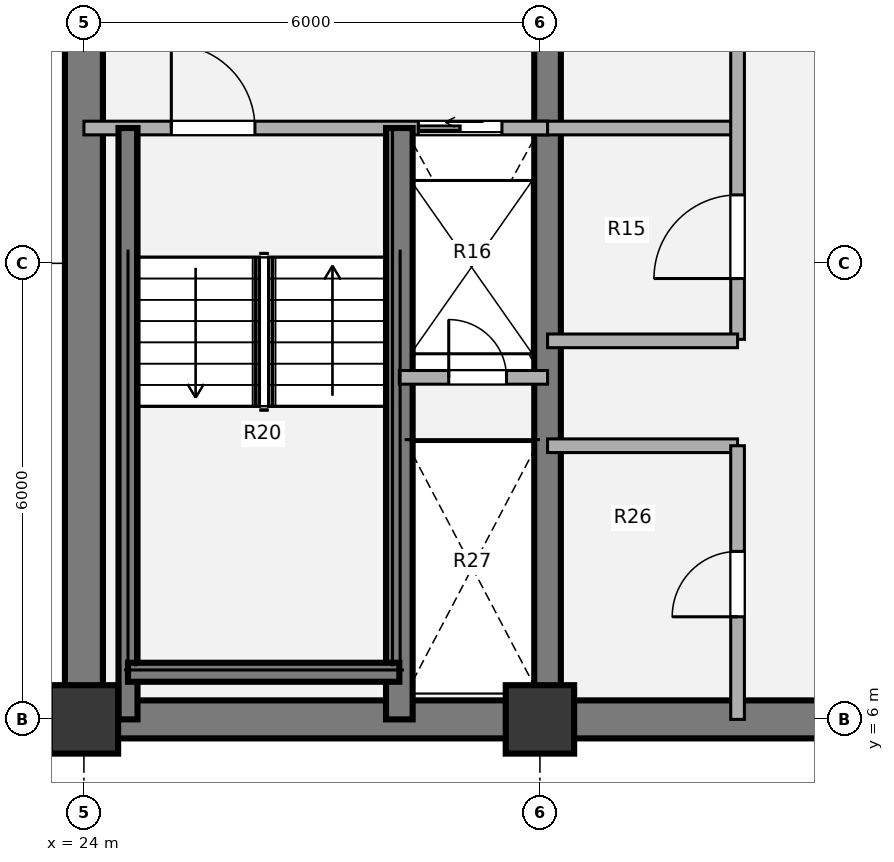
"""IFC4 building model, lengths in metres.
Left out: names, types, materials, properties, quantities, classifications, styles, units other than length and angle.
Written with IfcOpenShell. Run it as: python <this file> out.ifc"""

import sys

from ifc_helpers import new_model, si_unit, direction, frame, frame_2d, origin, origin_2d, place, context, subcontext, project, spatial, rectangle, extrude, source, transform, mapped, element, fill, save


model = new_model("IFC4")
c1 = context("Model", 3, precision=1e-05, world=origin(), true_north=direction((0.0, 1.0)))
c2 = subcontext(c1, "Body", "Model", "MODEL_VIEW")
j1 = project(units=[si_unit("LENGTHUNIT", "METRE"), si_unit("PLANEANGLEUNIT", "RADIAN")], contexts=[c1])
p1 = place(None, origin())
s1 = spatial("IfcSite", under=j1, at=p1, CompositionType="ELEMENT")
p2 = place(p1, origin())
s2 = spatial("IfcBuilding", under=s1, at=p2, CompositionType="ELEMENT")
p3 = place(p2, frame((0.0, 0.0, 146.52)))
s3 = spatial("IfcBuildingStorey", under=s2, at=p3, CompositionType="ELEMENT", Elevation=146.52)
m1 = source(origin(), c2, "Body", "SweptSolid", [
    extrude(rectangle(XDim=0.9, YDim=0.9, at=origin_2d()), origin(), (0.0, 0.0, 1.0), 5.4),
])
for number, where, z_axis, x_axis in (
    (1, (24.0, 6.0, 0.0), (0.0, 0.0, 1.0), (1.0, 0.0, 0.0)),
    (2, (30.0, 6.0, 0.0), (0.0, 0.0, 1.0), (1.0, 0.0, 0.0)),
):
    element("IfcColumn", number, at=place(p3, frame(where, z_axis=z_axis, x_axis=x_axis)), inside=s3, PredefinedType="COLUMN", context=c2, shape_type="MappedRepresentation", body=[
        mapped(m1, transform((0.0, 0.0, 0.0), x_axis=(1.0, 0.0, 0.0), y_axis=(0.0, 1.0, 0.0), z_axis=(0.0, 0.0, 1.0), scale=1.0)),
    ])
p4 = place(p3, frame((48.25, 6.0, 0.0), z_axis=(0.0, 0.0, 1.0), x_axis=(-1.0, 0.0, 0.0)))
e3 = element("IfcWall", 3, at=p4, inside=s3, PredefinedType="SHEAR", context=c2, shape_type="SweptSolid", body=[
    extrude(rectangle(XDim=24.5, YDim=0.5, at=frame_2d((12.25, 0.0))), origin(), (0.0, 0.0, 1.0), 5.4),
])
p5 = place(p3, frame((24.0, 6.0, 0.0), z_axis=(0.0, 0.0, 1.0), x_axis=(0.0, 1.0, 0.0)))
e4 = element("IfcWall", 4, at=p5, inside=s3, PredefinedType="SHEAR", context=c2, shape_type="SweptSolid", body=[
    extrude(rectangle(XDim=12.0, YDim=0.5, at=frame_2d((6.0, 0.0))), origin(), (0.0, 0.0, 1.0), 5.4),
])
p6 = place(p3, frame((30.1, 6.0, 0.0), z_axis=(0.0, 0.0, 1.0), x_axis=(0.0, 1.0, 0.0)))
e5 = element("IfcWall", 5, at=p6, inside=s3, PredefinedType="SHEAR", context=c2, shape_type="SweptSolid", body=[
    extrude(rectangle(XDim=12.0, YDim=0.35, at=frame_2d((6.0, 0.0))), origin(), (0.0, 0.0, 1.0), 5.4),
])
p7 = place(p3, frame((30.0, 13.78, 0.0), z_axis=(0.0, 0.0, 1.0), x_axis=(1.0, 0.0, 0.0)))
e6 = element("IfcWall", 6, at=p7, inside=s3, PredefinedType="PARTITIONING", context=c2, shape_type="SweptSolid", body=[
    extrude(rectangle(XDim=2.6, YDim=0.18, at=frame_2d((1.3, 0.0))), origin(), (0.0, 0.0, 1.0), 5.05),
])
p8 = place(p3, frame((32.6, 11.0, 0.0), z_axis=(0.0, 0.0, 1.0), x_axis=(0.0, 1.0, 0.0)))
e7 = element("IfcWall", 7, at=p8, inside=s3, PredefinedType="PARTITIONING", context=c2, shape_type="SweptSolid", body=[
    extrude(rectangle(XDim=7.0, YDim=0.18, at=frame_2d((3.5, 0.0))), origin(), (0.0, 0.0, 1.0), 5.05),
])
p9 = place(p8, frame((0.8, 0.0, 0.0)))
e8 = element("IfcOpeningElement", 8, at=p9, cuts=e7, PredefinedType="OPENING", context=c2, shape_type="SweptSolid", body=[
    extrude(rectangle(XDim=1.1, YDim=2.1, at=origin_2d()), frame((0.55, 0.1, 1.05), z_axis=(0.0, -1.0, 0.0), x_axis=(1.0, 0.0, 0.0)), (0.0, 0.0, 1.0), 0.2),
])
for number, where, z_axis, x_axis in (
    (9, (30.1, 10.98, 0.0), (0.0, 0.0, 1.0), (1.0, 0.0, 0.0)),
    (10, (30.1, 9.6, 0.0), (0.0, 0.0, 1.0), (1.0, 0.0, 0.0)),
):
    element("IfcWall", number, at=place(p3, frame(where, z_axis=z_axis, x_axis=x_axis)), inside=s3, PredefinedType="PARTITIONING", context=c2, shape_type="SweptSolid", body=[
        extrude(rectangle(XDim=2.5, YDim=0.18, at=frame_2d((1.25, 0.0))), origin(), (0.0, 0.0, 1.0), 5.05),
    ])
p10 = place(p3, frame((32.6, 6.0, 0.0), z_axis=(0.0, 0.0, 1.0), x_axis=(0.0, 1.0, 0.0)))
e11 = element("IfcWall", 11, at=p10, inside=s3, PredefinedType="PARTITIONING", context=c2, shape_type="SweptSolid", body=[
    extrude(rectangle(XDim=3.6, YDim=0.18, at=frame_2d((1.8, 0.0))), origin(), (0.0, 0.0, 1.0), 5.05),
])
p11 = place(p10, frame((1.35, 0.0, 0.0)))
e12 = element("IfcOpeningElement", 12, at=p11, cuts=e11, PredefinedType="OPENING", context=c2, shape_type="SweptSolid", body=[
    extrude(rectangle(XDim=0.86, YDim=2.1, at=origin_2d()), frame((0.43, 0.1, 1.05), z_axis=(0.0, -1.0, 0.0), x_axis=(1.0, 0.0, 0.0)), (0.0, 0.0, 1.0), 0.2),
])
p12 = place(p3, frame((24.0, 13.78, 0.0), z_axis=(0.0, 0.0, 1.0), x_axis=(1.0, 0.0, 0.0)))
e13 = element("IfcWall", 13, at=p12, inside=s3, PredefinedType="PARTITIONING", context=c2, shape_type="SweptSolid", body=[
    extrude(rectangle(XDim=6.1, YDim=0.18, at=frame_2d((3.05, 0.0))), origin(), (0.0, 0.0, 1.0), 2.229),
])
p13 = place(p12, frame((1.15, 0.0, 0.0)))
e14 = element("IfcOpeningElement", 14, at=p13, cuts=e13, PredefinedType="OPENING", context=c2, shape_type="SweptSolid", body=[
    extrude(rectangle(XDim=1.1, YDim=2.1, at=origin_2d()), frame((0.55, 0.1, 1.05), z_axis=(0.0, -1.0, 0.0), x_axis=(1.0, 0.0, 0.0)), (0.0, 0.0, 1.0), 0.2),
])
p14 = place(p12, frame((4.4, 0.0, 0.0)))
e15 = element("IfcOpeningElement", 15, at=p14, cuts=e13, PredefinedType="OPENING", context=c2, shape_type="SweptSolid", body=[
    extrude(rectangle(XDim=1.1, YDim=2.1, at=origin_2d()), frame((0.55, 0.1, 1.05), z_axis=(0.0, -1.0, 0.0), x_axis=(1.0, 0.0, 0.0)), (0.0, 0.0, 1.0), 0.2),
])
p15 = place(p3, frame((28.15, 6.0, 0.0), z_axis=(0.0, 0.0, 1.0), x_axis=(0.0, 1.0, 0.0)))
e16 = element("IfcWall", 16, at=p15, inside=s3, PredefinedType="SHEAR", context=c2, shape_type="SweptSolid", body=[
    extrude(rectangle(XDim=7.78, YDim=0.35, at=frame_2d((3.89, 0.0))), origin(), (0.0, 0.0, 1.0), 5.4),
])
p16 = place(p3, frame((24.58, 6.0, 0.0), z_axis=(0.0, 0.0, 1.0), x_axis=(0.0, 1.0, 0.0)))
e17 = element("IfcWall", 17, at=p16, inside=s3, PredefinedType="SHEAR", context=c2, shape_type="SweptSolid", body=[
    extrude(rectangle(XDim=7.78, YDim=0.25, at=frame_2d((3.89, 0.0))), origin(), (0.0, 0.0, 1.0), 5.4),
])
p17 = place(p3, frame((24.58, 6.62, 0.0), z_axis=(0.0, 0.0, 1.0), x_axis=(1.0, 0.0, 0.0)))
e18 = element("IfcWall", 18, at=p17, inside=s3, PredefinedType="SHEAR", context=c2, shape_type="SweptSolid", body=[
    extrude(rectangle(XDim=3.57, YDim=0.25, at=frame_2d((1.785, 0.0))), origin(), (0.0, 0.0, 1.0), 5.4),
])
p18 = place(p3, frame((28.15, 10.5, 0.0), z_axis=(0.0, 0.0, 1.0), x_axis=(1.0, 0.0, 0.0)))
e19 = element("IfcWall", 19, at=p18, inside=s3, PredefinedType="PARTITIONING", context=c2, shape_type="SweptSolid", body=[
    extrude(rectangle(XDim=1.95, YDim=0.18, at=frame_2d((0.975, 0.0))), origin(), (0.0, 0.0, 1.0), 5.05),
])
p19 = place(p18, frame((0.65, 0.0, 0.0)))
e20 = element("IfcOpeningElement", 20, at=p19, cuts=e19, PredefinedType="OPENING", context=c2, shape_type="SweptSolid", body=[
    extrude(rectangle(XDim=0.76, YDim=2.05, at=origin_2d()), frame((0.38, 0.1, 1.025), z_axis=(0.0, -1.0, 0.0), x_axis=(1.0, 0.0, 0.0)), (0.0, 0.0, 1.0), 0.2),
])
m2 = source(origin(), c2, "Body", "SweptSolid", [
    extrude(rectangle(XDim=1.1, YDim=2.1, at=origin_2d()), frame((0.55, 0.025, 1.05), z_axis=(0.0, -1.0, 0.0), x_axis=(1.0, 0.0, 0.0)), (0.0, 0.0, 1.0), 0.05),
])
p20 = place(p9, origin())
e21 = element("IfcDoor", 21, at=p20, inside=s3, OperationType="SINGLE_SWING_LEFT", PredefinedType="DOOR", context=c2, shape_type="MappedRepresentation", body=[
    mapped(m2, transform((0.0, 0.0, 0.0), x_axis=(1.0, 0.0, 0.0), y_axis=(0.0, 1.0, 0.0), z_axis=(0.0, 0.0, 1.0), scale=1.0)),
])
fill(e8, e21)
m3 = source(origin(), c2, "Body", "SweptSolid", [
    extrude(rectangle(XDim=0.86, YDim=2.1, at=origin_2d()), frame((0.43, 0.025, 1.05), z_axis=(0.0, -1.0, 0.0), x_axis=(1.0, 0.0, 0.0)), (0.0, 0.0, 1.0), 0.05),
])
p21 = place(p11, origin())
e22 = element("IfcDoor", 22, at=p21, inside=s3, OperationType="SINGLE_SWING_LEFT", PredefinedType="DOOR", context=c2, shape_type="MappedRepresentation", body=[
    mapped(m3, transform((0.0, 0.0, 0.0), x_axis=(1.0, 0.0, 0.0), y_axis=(0.0, 1.0, 0.0), z_axis=(0.0, 0.0, 1.0), scale=1.0)),
])
fill(e12, e22)
m4 = source(origin(), c2, "Body", "SweptSolid", [
    extrude(rectangle(XDim=1.1, YDim=2.1, at=origin_2d()), frame((0.55, 0.025, 1.05), z_axis=(0.0, -1.0, 0.0), x_axis=(1.0, 0.0, 0.0)), (0.0, 0.0, 1.0), 0.05),
])
p22 = place(p13, origin())
e23 = element("IfcDoor", 23, at=p22, inside=s3, OperationType="SINGLE_SWING_LEFT", PredefinedType="DOOR", context=c2, shape_type="MappedRepresentation", body=[
    mapped(m4, transform((0.0, 0.0, 0.0), x_axis=(1.0, 0.0, 0.0), y_axis=(0.0, 1.0, 0.0), z_axis=(0.0, 0.0, 1.0), scale=1.0)),
])
fill(e14, e23)
m5 = source(origin(), c2, "Body", "SweptSolid", [
    extrude(rectangle(XDim=1.1, YDim=2.1, at=origin_2d()), frame((0.55, 0.025, 1.05), z_axis=(0.0, -1.0, 0.0), x_axis=(1.0, 0.0, 0.0)), (0.0, 0.0, 1.0), 0.05),
])
p23 = place(p14, origin())
e24 = element("IfcDoor", 24, at=p23, inside=s3, OperationType="SLIDING_TO_LEFT", PredefinedType="DOOR", context=c2, shape_type="MappedRepresentation", body=[
    mapped(m5, transform((0.0, 0.0, 0.0), x_axis=(1.0, 0.0, 0.0), y_axis=(0.0, 1.0, 0.0), z_axis=(0.0, 0.0, 1.0), scale=1.0)),
])
fill(e15, e24)
m6 = source(origin(), c2, "Body", "SweptSolid", [
    extrude(rectangle(XDim=0.76, YDim=2.05, at=origin_2d()), frame((0.38, 0.025, 1.025), z_axis=(0.0, -1.0, 0.0), x_axis=(1.0, 0.0, 0.0)), (0.0, 0.0, 1.0), 0.05),
])
p24 = place(p19, origin())
e25 = element("IfcDoor", 25, at=p24, inside=s3, OperationType="SINGLE_SWING_LEFT", PredefinedType="DOOR", context=c2, shape_type="MappedRepresentation", body=[
    mapped(m6, transform((0.0, 0.0, 0.0), x_axis=(1.0, 0.0, 0.0), y_axis=(0.0, 1.0, 0.0), z_axis=(0.0, 0.0, 1.0), scale=1.0)),
])
fill(e20, e25)
save(model, sys.argv[1])
